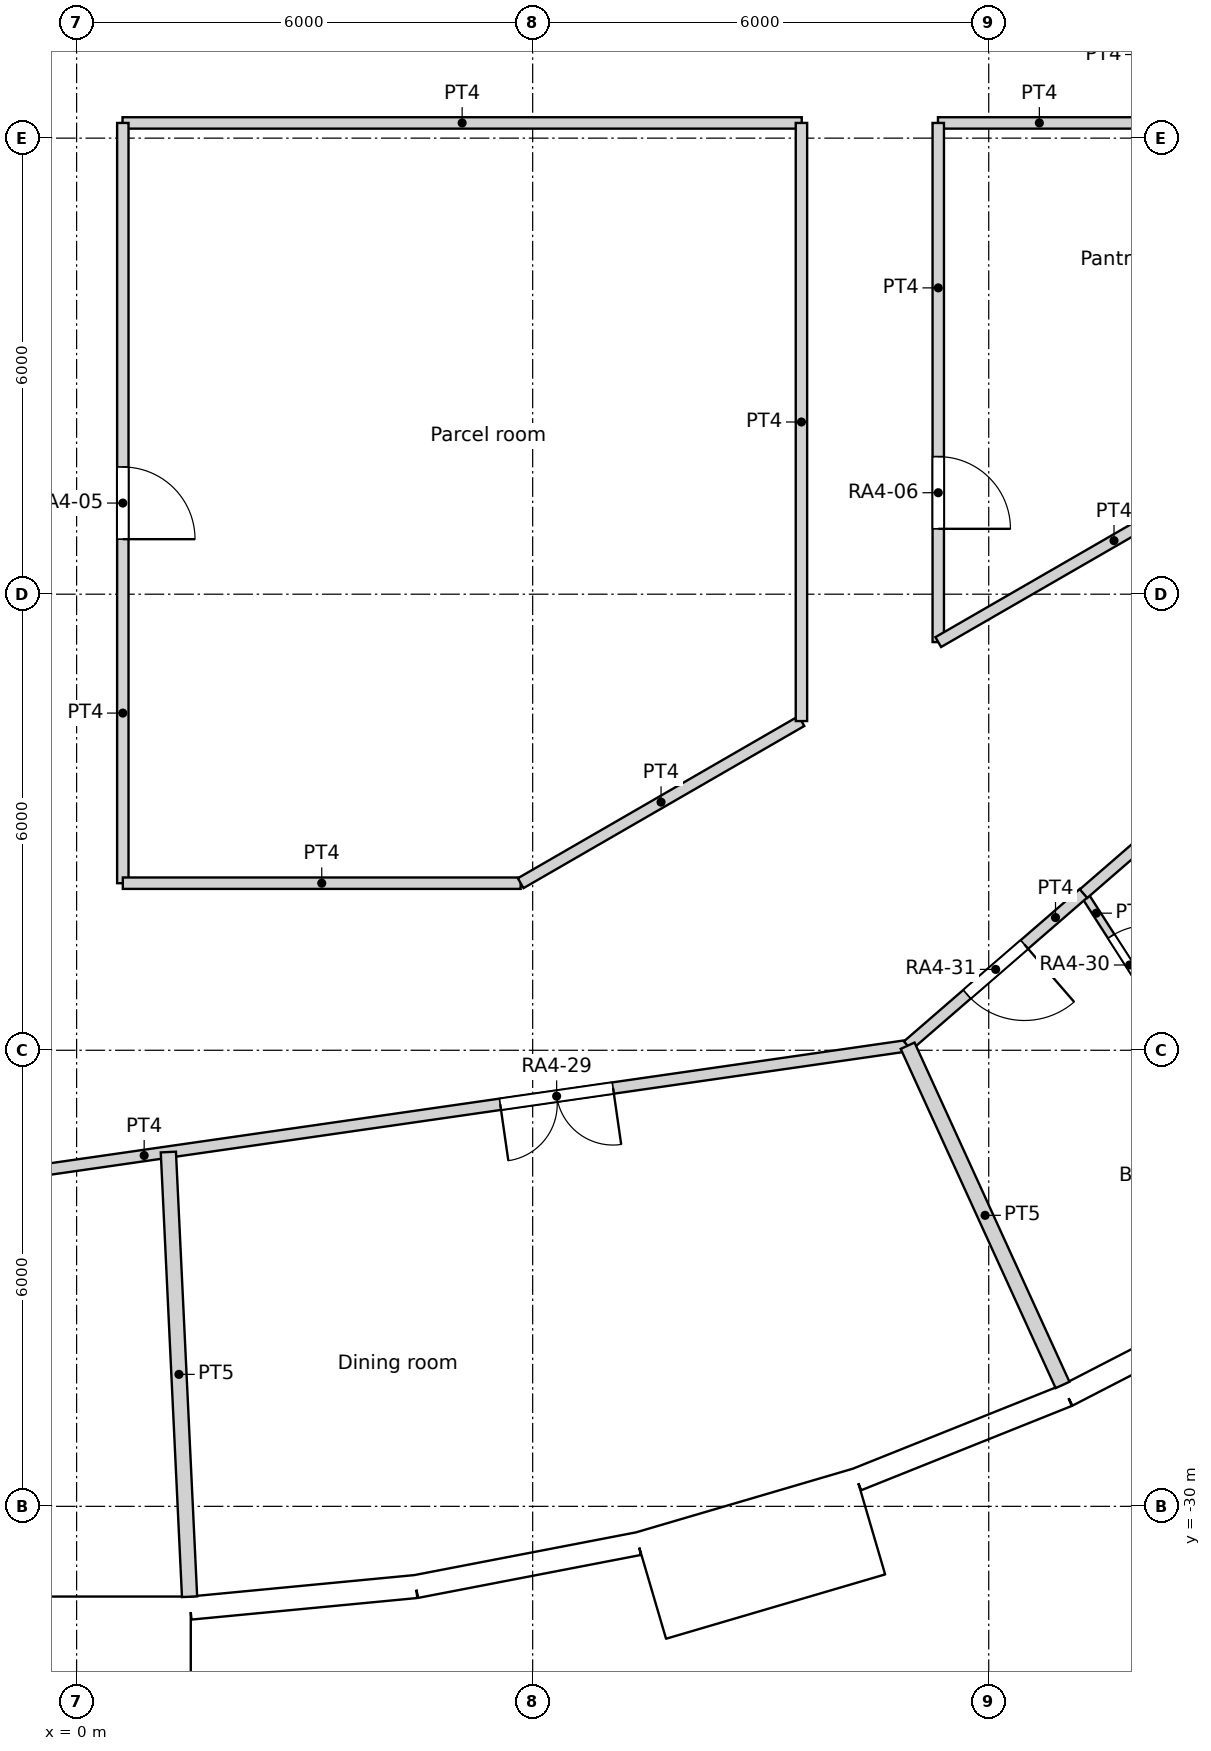
"""IFC4 building model, lengths in metres.
Left out: names, types, materials, properties, quantities, classifications, styles, units other than length and angle.
Written with IfcOpenShell. Run it as: python <this file> out.ifc"""

import sys

from ifc_helpers import new_model, si_unit, direction, frame, frame_2d, origin, origin_2d, place, context, subcontext, project, spatial, rectangle, circle, extrude, element, fill, save


model = new_model("IFC4")
c1 = context("Model", 3, precision=1e-05, world=origin(), true_north=direction((0.0, 1.0)))
c2 = subcontext(c1, "Body", "Model", "MODEL_VIEW")
j1 = project(units=[si_unit("LENGTHUNIT", "METRE"), si_unit("PLANEANGLEUNIT", "RADIAN")], contexts=[c1])
p1 = place(None, origin())
s1 = spatial("IfcSite", under=j1, at=p1, CompositionType="ELEMENT")
p2 = place(p1, origin())
s2 = spatial("IfcBuilding", under=s1, at=p2, CompositionType="ELEMENT")
p3 = place(p2, frame((0.0, 0.0, 60.6)))
s3 = spatial("IfcBuildingStorey", under=s2, at=p3, CompositionType="ELEMENT", Elevation=60.6)
for number, where, z_axis, x_axis in (
    (1, (1.44, -30.24, 0.0), (0.0, 0.0, 1.0), (1.0, 0.0, 0.0)),
    (2, (7.137, -29.421, 0.0), (0.0, 0.0, 1.0), (1.0, 0.0, 0.0)),
    (3, (12.576, -27.539, 0.0), (0.0, 0.0, 1.0), (1.0, 0.0, 0.0)),
):
    element("IfcColumn", number, at=place(p3, frame(where, z_axis=z_axis, x_axis=x_axis)), inside=s3, PredefinedType="COLUMN", context=c2, shape_type="SweptSolid", body=[
        extrude(circle(Radius=0.7, at=origin_2d()), origin(), (0.0, 0.0, 1.0), 3.6),
    ])
for number, where, z_axis, x_axis in (
    (4, (4.263, -24.175, 0.0), (0.0, 0.0, 1.0), (1.0, 0.0, 0.0)),
    (5, (9.723, -22.54, 0.0), (0.0, 0.0, 1.0), (1.0, 0.0, 0.0)),
):
    element("IfcColumn", number, at=place(p3, frame(where, z_axis=z_axis, x_axis=x_axis)), inside=s3, PredefinedType="COLUMN", context=c2, shape_type="SweptSolid", body=[
        extrude(circle(Radius=0.75, at=origin_2d()), origin(), (0.0, 0.0, 1.0), 3.6),
    ])
for number, where, z_axis, x_axis in (
    (6, (1.406, -18.77, 0.0), (0.0, 0.0, 1.0), (1.0, 0.0, 0.0)),
    (7, (6.876, -17.521, 0.0), (0.0, 0.0, 1.0), (1.0, 0.0, 0.0)),
    (8, (11.735, -14.716, 0.0), (0.0, 0.0, 1.0), (1.0, 0.0, 0.0)),
):
    element("IfcColumn", number, at=place(p3, frame(where, z_axis=z_axis, x_axis=x_axis)), inside=s3, PredefinedType="COLUMN", context=c2, shape_type="SweptSolid", body=[
        extrude(circle(Radius=0.8, at=origin_2d()), origin(), (0.0, 0.0, 1.0), 3.6),
    ])
p4 = place(p3, frame((-1.5, -31.914, -0.45), z_axis=(0.0, 0.0, 1.0), x_axis=(1.0, 0.0, 0.0)))
e9 = element("IfcWall", 9, at=p4, inside=s3, PredefinedType="ELEMENTEDWALL", context=c2, shape_type="SweptSolid", body=[
    extrude(rectangle(XDim=3.0, YDim=1.45, at=frame_2d((1.5, 0.0))), origin(), (0.0, 0.0, 1.0), 3.6),
])
p5 = place(p4, frame((1.5, 0.0, 2.0)))
e10 = element("IfcOpeningElement", 10, at=p5, cuts=e9, PredefinedType="OPENING", context=c2, shape_type="SweptSolid", body=[
    extrude(circle(Radius=0.9, at=origin_2d()), frame((0.0, 0.735, 0.0), z_axis=(0.0, -1.0, 0.0), x_axis=(1.0, 0.0, 0.0)), (0.0, 0.0, 1.0), 1.47),
])
p6 = place(p3, frame((1.499, -31.338, 0.0), z_axis=(0.0, 0.0, 1.0), x_axis=(0.995473351551, 0.095041077185, 0.0)))
e11 = element("IfcWall", 11, at=p6, inside=s3, PredefinedType="SOLIDWALL", context=c2, shape_type="SweptSolid", body=[
    extrude(rectangle(XDim=2.98, YDim=0.3, at=frame_2d((1.49, 0.0))), origin(), (0.0, 0.0, 1.0), 2.65),
])
p7 = place(p6, frame((1.49, 0.0, 1.55)))
e12 = element("IfcOpeningElement", 12, at=p7, cuts=e11, PredefinedType="OPENING", context=c2, shape_type="SweptSolid", body=[
    extrude(circle(Radius=0.9, at=origin_2d()), frame((0.0, 0.16, 0.0), z_axis=(0.0, -1.0, 0.0), x_axis=(1.0, 0.0, 0.0)), (0.0, 0.0, 1.0), 0.32),
])
p8 = place(p3, frame((4.465, -31.055, 0.0), z_axis=(0.0, 0.0, 1.0), x_axis=(0.981924535406, 0.189272836848, 0.0)))
e13 = element("IfcWall", 13, at=p8, inside=s3, PredefinedType="SOLIDWALL", context=c2, shape_type="SweptSolid", body=[
    extrude(rectangle(XDim=2.98, YDim=0.3, at=frame_2d((1.49, 0.0))), origin(), (0.0, 0.0, 1.0), 3.15),
])
p9 = place(p8, frame((1.49, 0.0, 1.55)))
e14 = element("IfcOpeningElement", 14, at=p9, cuts=e13, PredefinedType="OPENING", context=c2, shape_type="SweptSolid", body=[
    extrude(circle(Radius=0.9, at=origin_2d()), frame((0.0, 0.16, 0.0), z_axis=(0.0, -1.0, 0.0), x_axis=(1.0, 0.0, 0.0)), (0.0, 0.0, 1.0), 0.32),
])
p10 = place(p3, frame((7.552, -31.044, -0.45), z_axis=(0.0, 0.0, 1.0), x_axis=(0.959489813418, 0.281743319258, 0.0)))
e15 = element("IfcWall", 15, at=p10, inside=s3, PredefinedType="ELEMENTEDWALL", context=c2, shape_type="SweptSolid", body=[
    extrude(rectangle(XDim=3.0, YDim=1.45, at=frame_2d((1.5, 0.0))), origin(), (0.0, 0.0, 1.0), 3.6),
])
p11 = place(p10, frame((1.5, 0.0, 2.0)))
e16 = element("IfcOpeningElement", 16, at=p11, cuts=e15, PredefinedType="OPENING", context=c2, shape_type="SweptSolid", body=[
    extrude(circle(Radius=0.9, at=origin_2d()), frame((0.0, 0.735, 0.0), z_axis=(0.0, -1.0, 0.0), x_axis=(1.0, 0.0, 0.0)), (0.0, 0.0, 1.0), 1.47),
])
p12 = place(p3, frame((10.267, -29.646, 0.0), z_axis=(0.0, 0.0, 1.0), x_axis=(0.928403213937, 0.371574316054, 0.0)))
e17 = element("IfcWall", 17, at=p12, inside=s3, PredefinedType="SOLIDWALL", context=c2, shape_type="SweptSolid", body=[
    extrude(rectangle(XDim=2.98, YDim=0.3, at=frame_2d((1.49, 0.0))), origin(), (0.0, 0.0, 1.0), 2.65),
])
p13 = place(p12, frame((1.49, 0.0, 1.55)))
e18 = element("IfcOpeningElement", 18, at=p13, cuts=e17, PredefinedType="OPENING", context=c2, shape_type="SweptSolid", body=[
    extrude(circle(Radius=0.9, at=origin_2d()), frame((0.0, 0.16, 0.0), z_axis=(0.0, -1.0, 0.0), x_axis=(1.0, 0.0, 0.0)), (0.0, 0.0, 1.0), 0.32),
])
p14 = place(p3, frame((13.033, -28.539, 0.0), z_axis=(0.0, 0.0, 1.0), x_axis=(0.888819853856, 0.458256770153, 0.0)))
e19 = element("IfcWall", 19, at=p14, inside=s3, PredefinedType="SOLIDWALL", context=c2, shape_type="SweptSolid", body=[
    extrude(rectangle(XDim=2.98, YDim=0.3, at=frame_2d((1.49, 0.0))), origin(), (0.0, 0.0, 1.0), 3.15),
])
p15 = place(p14, frame((1.49, 0.0, 1.55)))
e20 = element("IfcOpeningElement", 20, at=p15, cuts=e19, PredefinedType="OPENING", context=c2, shape_type="SweptSolid", body=[
    extrude(circle(Radius=0.9, at=origin_2d()), frame((0.0, 0.16, 0.0), z_axis=(0.0, -1.0, 0.0), x_axis=(1.0, 0.0, 0.0)), (0.0, 0.0, 1.0), 0.32),
])
p16 = place(p3, frame((0.604, -11.8, 0.0), z_axis=(0.0, 0.0, 1.0), x_axis=(1.0, 0.0, 0.0)))
e21 = element("IfcWall", 21, at=p16, inside=s3, PredefinedType="PARTITIONING", context=c2, shape_type="SweptSolid", body=[
    extrude(rectangle(XDim=8.936, YDim=0.15, at=frame_2d((4.468, 0.0))), origin(), (0.0, 0.0, 1.0), 3.15),
])
p17 = place(p3, frame((11.332, -11.8, 0.0), z_axis=(0.0, 0.0, 1.0), x_axis=(1.0, 0.0, 0.0)))
e22 = element("IfcWall", 22, at=p17, inside=s3, PredefinedType="PARTITIONING", context=c2, shape_type="SweptSolid", body=[
    extrude(rectangle(XDim=2.668, YDim=0.15, at=frame_2d((1.334, 0.0))), origin(), (0.0, 0.0, 1.0), 3.15),
])
p18 = place(p3, frame((13.247, -21.939, 0.0), z_axis=(0.0, 0.0, 1.0), x_axis=(0.755420750547, 0.655240024451, 0.0)))
e23 = element("IfcWall", 23, at=p18, inside=s3, PredefinedType="PARTITIONING", context=c2, shape_type="SweptSolid", body=[
    extrude(rectangle(XDim=11.771, YDim=0.15, at=frame_2d((5.885, 0.0))), origin(), (0.0, 0.0, 1.0), 3.15),
])
p19 = place(p18, frame((4.513, 0.0, 0.0)))
e24 = element("IfcOpeningElement", 24, at=p19, cuts=e23, PredefinedType="OPENING", context=c2, shape_type="SweptSolid", body=[
    extrude(rectangle(XDim=1.0, YDim=2.1, at=frame_2d((0.5, 1.05))), frame((0.0, 0.075, 0.0), z_axis=(0.0, -1.0, 0.0), x_axis=(1.0, 0.0, 0.0)), (0.0, 0.0, 1.0), 0.15),
])
p20 = place(p3, frame((0.608, -21.802, 0.0), z_axis=(0.0, 0.0, 1.0), x_axis=(0.0, 1.0, 0.0)))
e25 = element("IfcWall", 25, at=p20, inside=s3, PredefinedType="PARTITIONING", context=c2, shape_type="SweptSolid", body=[
    extrude(rectangle(XDim=10.002, YDim=0.15, at=frame_2d((5.001, 0.0))), origin(), (0.0, 0.0, 1.0), 3.15),
])
p21 = place(p20, frame((4.526, 0.0, 0.0)))
e26 = element("IfcOpeningElement", 26, at=p21, cuts=e25, PredefinedType="OPENING", context=c2, shape_type="SweptSolid", body=[
    extrude(rectangle(XDim=0.95, YDim=2.1, at=frame_2d((0.475, 1.05))), frame((0.0, 0.075, 0.0), z_axis=(0.0, -1.0, 0.0), x_axis=(1.0, 0.0, 0.0)), (0.0, 0.0, 1.0), 0.15),
])
p22 = place(p3, frame((0.608, -21.802, 0.0), z_axis=(0.0, 0.0, 1.0), x_axis=(1.0, 0.0, 0.0)))
e27 = element("IfcWall", 27, at=p22, inside=s3, PredefinedType="PARTITIONING", context=c2, shape_type="SweptSolid", body=[
    extrude(rectangle(XDim=5.234, YDim=0.15, at=frame_2d((2.617, 0.0))), origin(), (0.0, 0.0, 1.0), 3.15),
])
p23 = place(p3, frame((5.842, -21.802, 0.0), z_axis=(0.0, 0.0, 1.0), x_axis=(0.865983505205, 0.500072563448, 0.0)))
e28 = element("IfcWall", 28, at=p23, inside=s3, PredefinedType="PARTITIONING", context=c2, shape_type="SweptSolid", body=[
    extrude(rectangle(XDim=4.265, YDim=0.15, at=frame_2d((2.133, 0.0))), origin(), (0.0, 0.0, 1.0), 3.15),
])
p24 = place(p3, frame((9.536, -19.669, 0.0), z_axis=(0.0, 0.0, 1.0), x_axis=(0.0, 1.0, 0.0)))
e29 = element("IfcWall", 29, at=p24, inside=s3, PredefinedType="PARTITIONING", context=c2, shape_type="SweptSolid", body=[
    extrude(rectangle(XDim=7.869, YDim=0.15, at=frame_2d((3.935, 0.0))), origin(), (0.0, 0.0, 1.0), 3.15),
])
p25 = place(p3, frame((11.336, -18.63, 0.0), z_axis=(0.0, 0.0, 1.0), x_axis=(0.0, 1.0, 0.0)))
e30 = element("IfcWall", 30, at=p25, inside=s3, PredefinedType="PARTITIONING", context=c2, shape_type="SweptSolid", body=[
    extrude(rectangle(XDim=6.83, YDim=0.15, at=frame_2d((3.415, 0.0))), origin(), (0.0, 0.0, 1.0), 3.15),
])
p26 = place(p25, frame((1.49, 0.0, 0.0)))
e31 = element("IfcOpeningElement", 31, at=p26, cuts=e30, PredefinedType="OPENING", context=c2, shape_type="SweptSolid", body=[
    extrude(rectangle(XDim=0.95, YDim=2.1, at=frame_2d((0.475, 1.05))), frame((0.0, 0.075, 0.0), z_axis=(0.0, -1.0, 0.0), x_axis=(1.0, 0.0, 0.0)), (0.0, 0.0, 1.0), 0.15),
])
p27 = place(p3, frame((11.336, -18.63, 0.0), z_axis=(0.0, 0.0, 1.0), x_axis=(0.866056911224, 0.499945423543, 0.0)))
e32 = element("IfcWall", 32, at=p27, inside=s3, PredefinedType="PARTITIONING", context=c2, shape_type="SweptSolid", body=[
    extrude(rectangle(XDim=5.339, YDim=0.15, at=frame_2d((2.67, 0.0))), origin(), (0.0, 0.0, 1.0), 3.15),
])
p28 = place(p3, frame((-3.746, -26.051, 0.0), z_axis=(0.0, 0.0, 1.0), x_axis=(0.9898137179, 0.142368549395, 0.0)))
e33 = element("IfcWall", 33, at=p28, inside=s3, PredefinedType="PARTITIONING", context=c2, shape_type="SweptSolid", body=[
    extrude(rectangle(XDim=14.83, YDim=0.15, at=frame_2d((7.415, 0.0))), origin(), (0.0, 0.0, 1.0), 3.15),
])
p29 = place(p28, frame((9.415, 0.0, 0.0)))
e34 = element("IfcOpeningElement", 34, at=p29, cuts=e33, PredefinedType="OPENING", context=c2, shape_type="SweptSolid", body=[
    extrude(rectangle(XDim=1.5, YDim=2.1, at=frame_2d((0.75, 1.05))), frame((0.0, 0.075, 0.0), z_axis=(0.0, -1.0, 0.0), x_axis=(1.0, 0.0, 0.0)), (0.0, 0.0, 1.0), 0.15),
])
p30 = place(p3, frame((10.933, -23.94, 0.0), z_axis=(0.0, 0.0, 1.0), x_axis=(0.755675945931, 0.654945696025, 0.0)))
e35 = element("IfcWall", 35, at=p30, inside=s3, PredefinedType="PARTITIONING", context=c2, shape_type="SweptSolid", body=[
    extrude(rectangle(XDim=3.066, YDim=0.15, at=frame_2d((1.533, 0.0))), origin(), (0.0, 0.0, 1.0), 3.15),
])
p31 = place(p30, frame((1.033, 0.0, 0.0)))
e36 = element("IfcOpeningElement", 36, at=p31, cuts=e35, PredefinedType="OPENING", context=c2, shape_type="SweptSolid", body=[
    extrude(rectangle(XDim=1.0, YDim=2.1, at=frame_2d((0.5, 1.05))), frame((0.0, 0.075, 0.0), z_axis=(0.0, -1.0, 0.0), x_axis=(1.0, 0.0, 0.0)), (0.0, 0.0, 1.0), 0.15),
])
p32 = place(p3, frame((1.207, -25.339, 0.0), z_axis=(0.0, 0.0, 1.0), x_axis=(0.047648334785, -0.998864173045, 0.0)))
e37 = element("IfcWall", 37, at=p32, inside=s3, PredefinedType="PARTITIONING", context=c2, shape_type="SweptSolid", body=[
    extrude(rectangle(XDim=5.856, YDim=0.2, at=frame_2d((2.928, 0.0))), origin(), (0.0, 0.0, 1.0), 3.15),
])
p33 = place(p3, frame((10.933, -23.94, 0.0), z_axis=(0.0, 0.0, 1.0), x_axis=(0.415346954488, -0.909663073559, 0.0)))
e38 = element("IfcWall", 38, at=p33, inside=s3, PredefinedType="PARTITIONING", context=c2, shape_type="SweptSolid", body=[
    extrude(rectangle(XDim=4.906, YDim=0.2, at=frame_2d((2.453, 0.0))), origin(), (0.0, 0.0, 1.0), 3.15),
])
p34 = place(p3, frame((13.248, -21.935, 0.0), z_axis=(0.0, 0.0, 1.0), x_axis=(0.540597960994, -0.841281073464, 0.0)))
e39 = element("IfcWall", 39, at=p34, inside=s3, PredefinedType="PARTITIONING", context=c2, shape_type="SweptSolid", body=[
    extrude(rectangle(XDim=2.242, YDim=0.1, at=frame_2d((1.121, 0.0))), origin(), (0.0, 0.0, 1.0), 3.15),
])
p35 = place(p34, frame((0.671, 0.0, 0.0)))
e40 = element("IfcOpeningElement", 40, at=p35, cuts=e39, PredefinedType="OPENING", context=c2, shape_type="SweptSolid", body=[
    extrude(rectangle(XDim=0.9, YDim=2.04, at=frame_2d((0.45, 1.02))), frame((0.0, 0.05, 0.0), z_axis=(0.0, -1.0, 0.0), x_axis=(1.0, 0.0, 0.0)), (0.0, 0.0, 1.0), 0.1),
])
p36 = place(p5, origin())
e41 = element("IfcWindow", 41, at=p36, inside=s3, PartitioningType="SINGLE_PANEL", PredefinedType="WINDOW", context=c2, shape_type="SweptSolid", body=[
    extrude(circle(Radius=0.9, at=origin_2d()), frame((0.0, 0.695, 0.0), z_axis=(0.0, -1.0, 0.0), x_axis=(1.0, 0.0, 0.0)), (0.0, 0.0, 1.0), 0.1),
])
fill(e10, e41)
p37 = place(p7, origin())
e42 = element("IfcWindow", 42, at=p37, inside=s3, PartitioningType="SINGLE_PANEL", PredefinedType="WINDOW", context=c2, shape_type="SweptSolid", body=[
    extrude(circle(Radius=0.9, at=origin_2d()), frame((0.0, 0.12, 0.0), z_axis=(0.0, -1.0, 0.0), x_axis=(1.0, 0.0, 0.0)), (0.0, 0.0, 1.0), 0.1),
])
fill(e12, e42)
p38 = place(p9, origin())
e43 = element("IfcWindow", 43, at=p38, inside=s3, PartitioningType="SINGLE_PANEL", PredefinedType="WINDOW", context=c2, shape_type="SweptSolid", body=[
    extrude(circle(Radius=0.9, at=origin_2d()), frame((0.0, 0.12, 0.0), z_axis=(0.0, -1.0, 0.0), x_axis=(1.0, 0.0, 0.0)), (0.0, 0.0, 1.0), 0.1),
])
fill(e14, e43)
p39 = place(p11, origin())
e44 = element("IfcWindow", 44, at=p39, inside=s3, PartitioningType="SINGLE_PANEL", PredefinedType="WINDOW", context=c2, shape_type="SweptSolid", body=[
    extrude(circle(Radius=0.9, at=origin_2d()), frame((0.0, 0.695, 0.0), z_axis=(0.0, -1.0, 0.0), x_axis=(1.0, 0.0, 0.0)), (0.0, 0.0, 1.0), 0.1),
])
fill(e16, e44)
p40 = place(p13, origin())
e45 = element("IfcWindow", 45, at=p40, inside=s3, PartitioningType="SINGLE_PANEL", PredefinedType="WINDOW", context=c2, shape_type="SweptSolid", body=[
    extrude(circle(Radius=0.9, at=origin_2d()), frame((0.0, 0.12, 0.0), z_axis=(0.0, -1.0, 0.0), x_axis=(1.0, 0.0, 0.0)), (0.0, 0.0, 1.0), 0.1),
])
fill(e18, e45)
p41 = place(p15, origin())
e46 = element("IfcWindow", 46, at=p41, inside=s3, PartitioningType="SINGLE_PANEL", PredefinedType="WINDOW", context=c2, shape_type="SweptSolid", body=[
    extrude(circle(Radius=0.9, at=origin_2d()), frame((0.0, 0.12, 0.0), z_axis=(0.0, -1.0, 0.0), x_axis=(1.0, 0.0, 0.0)), (0.0, 0.0, 1.0), 0.1),
])
fill(e20, e46)
p42 = place(p21, origin())
e47 = element("IfcDoor", 47, at=p42, inside=s3, OperationType="SINGLE_SWING_RIGHT", PredefinedType="DOOR", context=c2, shape_type="SweptSolid", body=[
    extrude(rectangle(XDim=0.95, YDim=2.1, at=frame_2d((0.475, 1.05))), frame((0.0, 0.025, 0.0), z_axis=(0.0, -1.0, 0.0), x_axis=(1.0, 0.0, 0.0)), (0.0, 0.0, 1.0), 0.05),
])
fill(e26, e47)
p43 = place(p26, origin())
e48 = element("IfcDoor", 48, at=p43, inside=s3, OperationType="SINGLE_SWING_RIGHT", PredefinedType="DOOR", context=c2, shape_type="SweptSolid", body=[
    extrude(rectangle(XDim=0.95, YDim=2.1, at=frame_2d((0.475, 1.05))), frame((0.0, 0.025, 0.0), z_axis=(0.0, -1.0, 0.0), x_axis=(1.0, 0.0, 0.0)), (0.0, 0.0, 1.0), 0.05),
])
fill(e31, e48)
p44 = place(p29, origin())
e49 = element("IfcDoor", 49, at=p44, inside=s3, OperationType="DOUBLE_DOOR_SINGLE_SWING", PredefinedType="DOOR", context=c2, shape_type="SweptSolid", body=[
    extrude(rectangle(XDim=1.5, YDim=2.1, at=frame_2d((0.75, 1.05))), frame((0.0, 0.025, 0.0), z_axis=(0.0, -1.0, 0.0), x_axis=(1.0, 0.0, 0.0)), (0.0, 0.0, 1.0), 0.05),
])
fill(e34, e49)
p45 = place(p35, origin())
e50 = element("IfcDoor", 50, at=p45, inside=s3, OperationType="SINGLE_SWING_RIGHT", PredefinedType="DOOR", context=c2, shape_type="SweptSolid", body=[
    extrude(rectangle(XDim=0.9, YDim=2.04, at=frame_2d((0.45, 1.02))), frame((0.0, 0.025, 0.0), z_axis=(0.0, -1.0, 0.0), x_axis=(1.0, 0.0, 0.0)), (0.0, 0.0, 1.0), 0.05),
])
fill(e40, e50)
p46 = place(p31, origin())
e51 = element("IfcDoor", 51, at=p46, inside=s3, OperationType="SINGLE_SWING_LEFT", PredefinedType="DOOR", context=c2, shape_type="SweptSolid", body=[
    extrude(rectangle(XDim=1.0, YDim=2.1, at=frame_2d((0.5, 1.05))), frame((0.0, 0.025, 0.0), z_axis=(0.0, -1.0, 0.0), x_axis=(1.0, 0.0, 0.0)), (0.0, 0.0, 1.0), 0.05),
])
fill(e36, e51)
save(model, sys.argv[1])
